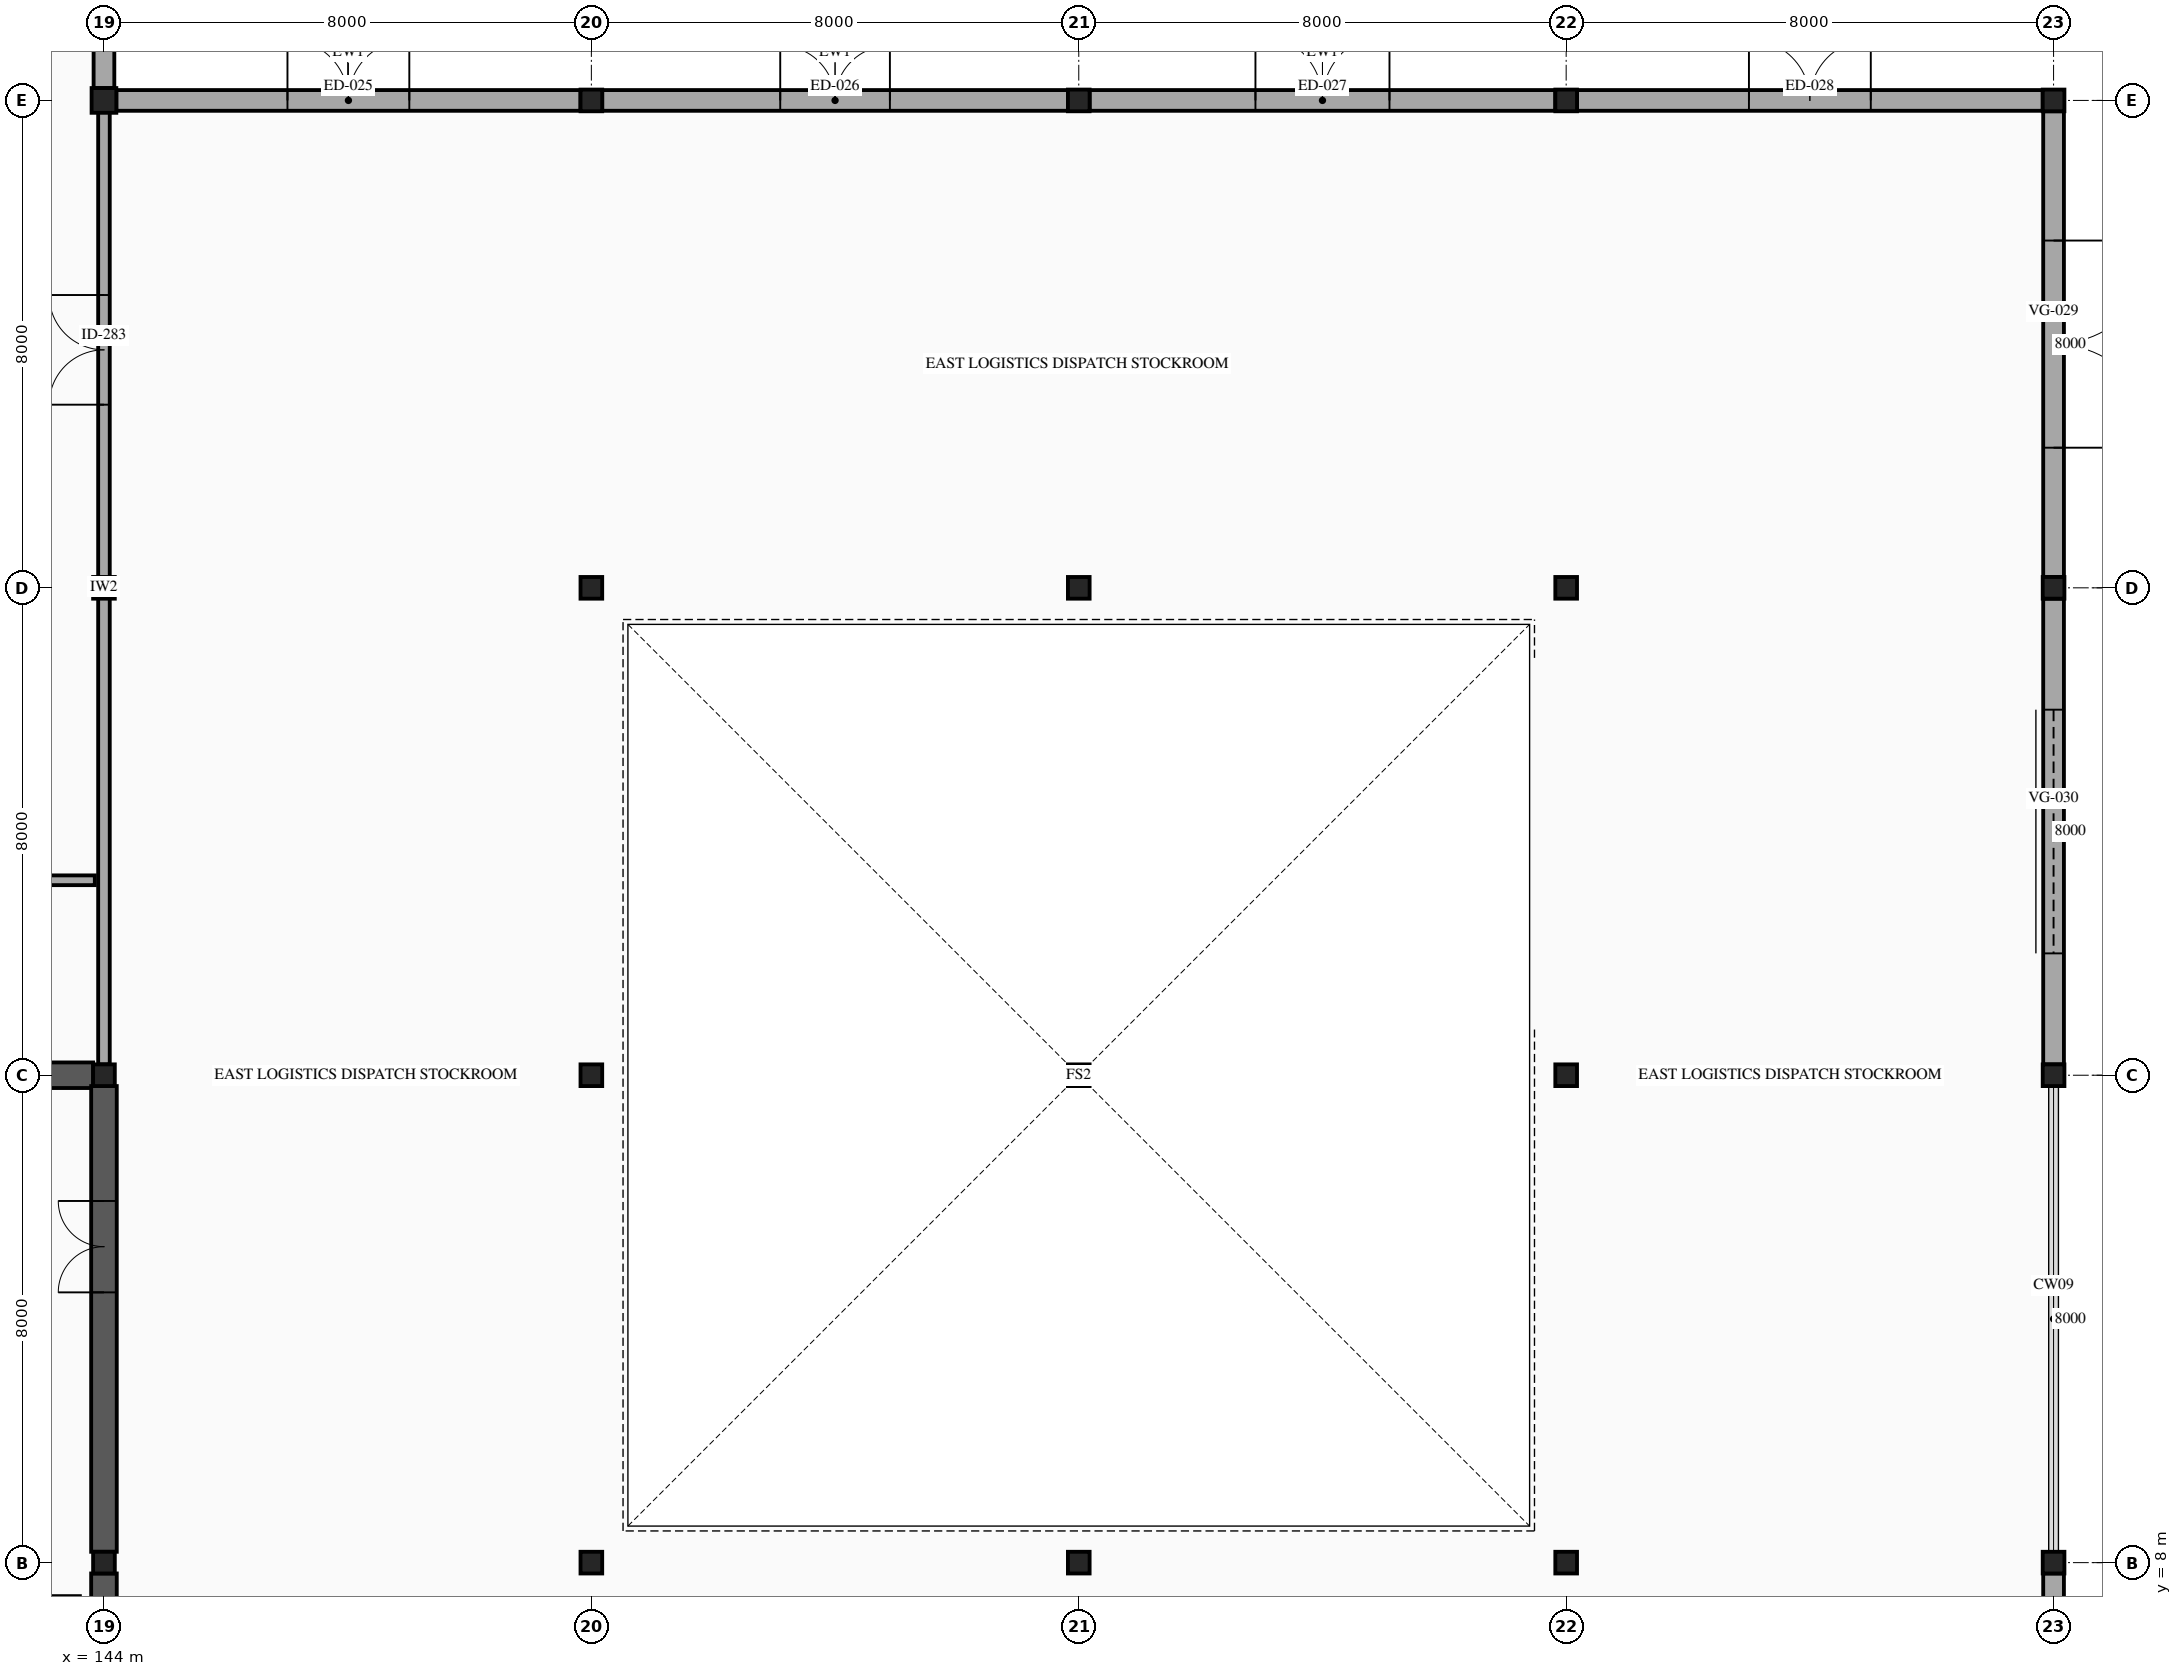
"""IFC4 building model, lengths in metres.
Left out: names, types, materials, properties, quantities, classifications, styles, units other than length and angle.
Written with IfcOpenShell. Run it as: python <this file> out.ifc"""

import sys

from ifc_helpers import new_model, si_unit, direction, frame, frame_2d, origin, origin_2d, place, context, subcontext, project, spatial, rectangle, hollow_rectangle, hollow_circle, extrude, element, fill, save


model = new_model("IFC4")
c1 = context("Model", 3, precision=1e-05, world=origin(), true_north=direction((0.0, 1.0)))
c2 = subcontext(c1, "Body", "Model", "MODEL_VIEW")
j1 = project(units=[si_unit("LENGTHUNIT", "METRE"), si_unit("PLANEANGLEUNIT", "RADIAN")], contexts=[c1])
p1 = place(None, origin())
s1 = spatial("IfcSite", under=j1, at=p1, CompositionType="ELEMENT")
p2 = place(p1, origin())
s2 = spatial("IfcBuilding", under=s1, at=p2, CompositionType="ELEMENT")
p3 = place(p2, origin())
s3 = spatial("IfcBuildingStorey", under=s2, at=p3, CompositionType="ELEMENT", Elevation=0.0)
for number, where, z_axis, x_axis in (
    (1, (144.0, 8.0, 0.0), (0.0, 0.0, 1.0), (1.0, 0.0, 0.0)),
    (2, (144.0, 16.0, 0.0), (0.0, 0.0, 1.0), (1.0, 0.0, 0.0)),
    (3, (144.0, 24.0, 0.0), (0.0, 0.0, 1.0), (1.0, 0.0, 0.0)),
):
    element("IfcColumn", number, at=place(p3, frame(where, z_axis=z_axis, x_axis=x_axis)), inside=s3, PredefinedType="COLUMN", context=c2, shape_type="SweptSolid", body=[
        extrude(hollow_rectangle(XDim=0.356, YDim=0.356, WallThickness=0.012, InnerFilletRadius=0.012, OuterFilletRadius=0.024, at=origin_2d()), origin(), (0.0, 0.0, 1.0), 5.6),
    ])
p4 = place(p3, frame((144.0, 32.0, 0.0), z_axis=(0.0, 0.0, 1.0), x_axis=(1.0, 0.0, 0.0)))
e4 = element("IfcColumn", 4, at=p4, inside=s3, PredefinedType="COLUMN", context=c2, shape_type="SweptSolid", body=[
    extrude(hollow_circle(Radius=0.203, WallThickness=0.012, at=origin_2d()), origin(), (0.0, 0.0, 1.0), 5.6),
])
for number, where, z_axis, x_axis in (
    (5, (152.0, 8.0, 0.0), (0.0, 0.0, 1.0), (1.0, 0.0, 0.0)),
    (6, (152.0, 16.0, 0.0), (0.0, 0.0, 1.0), (1.0, 0.0, 0.0)),
    (7, (152.0, 24.0, 0.0), (0.0, 0.0, 1.0), (1.0, 0.0, 0.0)),
    (8, (152.0, 32.0, 0.0), (0.0, 0.0, 1.0), (1.0, 0.0, 0.0)),
    (9, (160.0, 8.0, 0.0), (0.0, 0.0, 1.0), (1.0, 0.0, 0.0)),
    (10, (160.0, 16.0, 0.0), (0.0, 0.0, 1.0), (1.0, 0.0, 0.0)),
    (11, (160.0, 24.0, 0.0), (0.0, 0.0, 1.0), (1.0, 0.0, 0.0)),
    (12, (160.0, 32.0, 0.0), (0.0, 0.0, 1.0), (1.0, 0.0, 0.0)),
    (13, (168.0, 8.0, 0.0), (0.0, 0.0, 1.0), (1.0, 0.0, 0.0)),
    (14, (168.0, 16.0, 0.0), (0.0, 0.0, 1.0), (1.0, 0.0, 0.0)),
    (15, (168.0, 24.0, 0.0), (0.0, 0.0, 1.0), (1.0, 0.0, 0.0)),
    (16, (168.0, 32.0, 0.0), (0.0, 0.0, 1.0), (1.0, 0.0, 0.0)),
    (17, (176.0, 8.0, 0.0), (0.0, 0.0, 1.0), (1.0, 0.0, 0.0)),
    (18, (176.0, 16.0, 0.0), (0.0, 0.0, 1.0), (1.0, 0.0, 0.0)),
    (19, (176.0, 24.0, 0.0), (0.0, 0.0, 1.0), (1.0, 0.0, 0.0)),
    (20, (176.0, 32.0, 0.0), (0.0, 0.0, 1.0), (1.0, 0.0, 0.0)),
):
    element("IfcColumn", number, at=place(p3, frame(where, z_axis=z_axis, x_axis=x_axis)), inside=s3, PredefinedType="COLUMN", context=c2, shape_type="SweptSolid", body=[
        extrude(hollow_rectangle(XDim=0.356, YDim=0.356, WallThickness=0.012, InnerFilletRadius=0.012, OuterFilletRadius=0.024, at=origin_2d()), origin(), (0.0, 0.0, 1.0), 5.6),
    ])
p5 = place(p3, frame((144.0, 39.822, 0.0), z_axis=(0.0, 0.0, 1.0), x_axis=(0.0, -1.0, 0.0)))
e21 = element("IfcWall", 21, at=p5, inside=s3, PredefinedType="STANDARD", context=c2, shape_type="SweptSolid", body=[
    extrude(rectangle(XDim=7.619, YDim=0.34, at=frame_2d((3.81, 0.0))), origin(), (0.0, 0.0, 1.0), 4.58),
])
p6 = place(p5, frame((2.709, 0.0, 0.0)))
e22 = element("IfcOpeningElement", 22, at=p6, cuts=e21, PredefinedType="OPENING", context=c2, shape_type="SweptSolid", body=[
    extrude(rectangle(XDim=2.2, YDim=2.45, at=frame_2d((1.1, 1.225))), frame((0.0, 0.18, 0.0), z_axis=(0.0, -1.0, 0.0), x_axis=(1.0, 0.0, 0.0)), (0.0, 0.0, 1.0), 0.36),
])
p7 = place(p3, frame((144.203, 32.0, 0.0), z_axis=(0.0, 0.0, 1.0), x_axis=(1.0, 0.0, 0.0)))
e23 = element("IfcWall", 23, at=p7, inside=s3, PredefinedType="STANDARD", context=c2, shape_type="SweptSolid", body=[
    extrude(rectangle(XDim=7.619, YDim=0.34, at=frame_2d((3.81, 0.0))), origin(), (0.0, 0.0, 1.0), 4.58),
])
p8 = place(p7, frame((2.809, 0.0, 0.0)))
e24 = element("IfcOpeningElement", 24, at=p8, cuts=e23, PredefinedType="OPENING", context=c2, shape_type="SweptSolid", body=[
    extrude(rectangle(XDim=2.0, YDim=2.35, at=frame_2d((1.0, 1.175))), frame((0.0, 0.18, 0.0), z_axis=(0.0, -1.0, 0.0), x_axis=(1.0, 0.0, 0.0)), (0.0, 0.0, 1.0), 0.36),
])
p9 = place(p3, frame((152.178, 32.0, 0.0), z_axis=(0.0, 0.0, 1.0), x_axis=(1.0, 0.0, 0.0)))
e25 = element("IfcWall", 25, at=p9, inside=s3, PredefinedType="STANDARD", context=c2, shape_type="SweptSolid", body=[
    extrude(rectangle(XDim=7.644, YDim=0.34, at=frame_2d((3.822, 0.0))), origin(), (0.0, 0.0, 1.0), 4.58),
])
p10 = place(p9, frame((2.922, 0.0, 0.0)))
e26 = element("IfcOpeningElement", 26, at=p10, cuts=e25, PredefinedType="OPENING", context=c2, shape_type="SweptSolid", body=[
    extrude(rectangle(XDim=1.8, YDim=2.3, at=frame_2d((0.9, 1.15))), frame((0.0, 0.18, 0.0), z_axis=(0.0, -1.0, 0.0), x_axis=(1.0, 0.0, 0.0)), (0.0, 0.0, 1.0), 0.36),
])
p11 = place(p3, frame((160.178, 32.0, 0.0), z_axis=(0.0, 0.0, 1.0), x_axis=(1.0, 0.0, 0.0)))
e27 = element("IfcWall", 27, at=p11, inside=s3, PredefinedType="STANDARD", context=c2, shape_type="SweptSolid", body=[
    extrude(rectangle(XDim=7.644, YDim=0.34, at=frame_2d((3.822, 0.0))), origin(), (0.0, 0.0, 1.0), 4.58),
])
p12 = place(p11, frame((2.722, 0.0, 0.0)))
e28 = element("IfcOpeningElement", 28, at=p12, cuts=e27, PredefinedType="OPENING", context=c2, shape_type="SweptSolid", body=[
    extrude(rectangle(XDim=2.2, YDim=2.45, at=frame_2d((1.1, 1.225))), frame((0.0, 0.18, 0.0), z_axis=(0.0, -1.0, 0.0), x_axis=(1.0, 0.0, 0.0)), (0.0, 0.0, 1.0), 0.36),
])
p13 = place(p3, frame((168.178, 32.0, 0.0), z_axis=(0.0, 0.0, 1.0), x_axis=(1.0, 0.0, 0.0)))
e29 = element("IfcWall", 29, at=p13, inside=s3, PredefinedType="STANDARD", context=c2, shape_type="SweptSolid", body=[
    extrude(rectangle(XDim=7.644, YDim=0.34, at=frame_2d((3.822, 0.0))), origin(), (0.0, 0.0, 1.0), 4.58),
])
p14 = place(p13, frame((2.822, 0.0, 0.0)))
e30 = element("IfcOpeningElement", 30, at=p14, cuts=e29, PredefinedType="OPENING", context=c2, shape_type="SweptSolid", body=[
    extrude(rectangle(XDim=2.0, YDim=2.35, at=frame_2d((1.0, 1.175))), frame((0.0, 0.18, 0.0), z_axis=(0.0, -1.0, 0.0), x_axis=(1.0, 0.0, 0.0)), (0.0, 0.0, 1.0), 0.36),
])
p15 = place(p3, frame((176.0, 31.822, 0.0), z_axis=(0.0, 0.0, 1.0), x_axis=(0.0, -1.0, 0.0)))
e31 = element("IfcWall", 31, at=p15, inside=s3, PredefinedType="STANDARD", context=c2, shape_type="SweptSolid", body=[
    extrude(rectangle(XDim=7.644, YDim=0.34, at=frame_2d((3.822, 0.0))), origin(), (0.0, 0.0, 1.0), 4.58),
])
p16 = place(p15, frame((2.122, 0.0, 0.0)))
e32 = element("IfcOpeningElement", 32, at=p16, cuts=e31, PredefinedType="OPENING", context=c2, shape_type="SweptSolid", body=[
    extrude(rectangle(XDim=3.4, YDim=2.5, at=frame_2d((1.7, 1.25))), frame((0.0, 0.18, 0.0), z_axis=(0.0, -1.0, 0.0), x_axis=(1.0, 0.0, 0.0)), (0.0, 0.0, 1.0), 0.36),
])
p17 = place(p3, frame((176.0, 23.822, 0.0), z_axis=(0.0, 0.0, 1.0), x_axis=(0.0, -1.0, 0.0)))
e33 = element("IfcWall", 33, at=p17, inside=s3, PredefinedType="STANDARD", context=c2, shape_type="SweptSolid", body=[
    extrude(rectangle(XDim=7.644, YDim=0.34, at=frame_2d((3.822, 0.0))), origin(), (0.0, 0.0, 1.0), 4.58),
])
p18 = place(p17, frame((1.822, 0.0, 0.0)))
e34 = element("IfcOpeningElement", 34, at=p18, cuts=e33, PredefinedType="OPENING", context=c2, shape_type="SweptSolid", body=[
    extrude(rectangle(XDim=4.0, YDim=2.75, at=frame_2d((2.0, 1.375))), frame((0.0, 0.18, 0.0), z_axis=(0.0, -1.0, 0.0), x_axis=(1.0, 0.0, 0.0)), (0.0, 0.0, 1.0), 0.36),
])
p19 = place(p3, frame((176.0, 7.822, 0.0), z_axis=(0.0, 0.0, 1.0), x_axis=(0.0, -1.0, 0.0)))
e35 = element("IfcWall", 35, at=p19, inside=s3, PredefinedType="STANDARD", context=c2, shape_type="SweptSolid", body=[
    extrude(rectangle(XDim=7.644, YDim=0.34, at=frame_2d((3.822, 0.0))), origin(), (0.0, 0.0, 1.0), 4.58),
])
p20 = place(p19, frame((2.822, 0.0, 0.0)))
e36 = element("IfcOpeningElement", 36, at=p20, cuts=e35, PredefinedType="OPENING", context=c2, shape_type="SweptSolid", body=[
    extrude(rectangle(XDim=2.0, YDim=2.35, at=frame_2d((1.0, 1.175))), frame((0.0, 0.18, 0.0), z_axis=(0.0, -1.0, 0.0), x_axis=(1.0, 0.0, 0.0)), (0.0, 0.0, 1.0), 0.36),
])
p21 = place(p3, frame((136.375, 16.0, 0.0), z_axis=(0.0, 0.0, 1.0), x_axis=(1.0, 0.0, 0.0)))
e37 = element("IfcWall", 37, at=p21, inside=s3, PredefinedType="SHEAR", context=c2, shape_type="SweptSolid", body=[
    extrude(rectangle(XDim=7.447, YDim=0.42, at=frame_2d((3.724, 0.0))), origin(), (0.0, 0.0, 1.0), 5.38),
])
p22 = place(p21, frame((2.974, 0.0, 0.0)))
e38 = element("IfcOpeningElement", 38, at=p22, cuts=e37, PredefinedType="OPENING", context=c2, shape_type="SweptSolid", body=[
    extrude(rectangle(XDim=1.5, YDim=2.15, at=frame_2d((0.75, 1.075))), frame((0.0, 0.22, 0.0), z_axis=(0.0, -1.0, 0.0), x_axis=(1.0, 0.0, 0.0)), (0.0, 0.0, 1.0), 0.44),
])
p23 = place(p3, frame((144.0, 0.178, 0.0), z_axis=(0.0, 0.0, 1.0), x_axis=(0.0, 1.0, 0.0)))
e39 = element("IfcWall", 39, at=p23, inside=s3, PredefinedType="SHEAR", context=c2, shape_type="SweptSolid", body=[
    extrude(rectangle(XDim=7.644, YDim=0.42, at=frame_2d((3.822, 0.0))), origin(), (0.0, 0.0, 1.0), 5.38),
])
p24 = place(p23, frame((1.736, 0.0, 0.0)))
e40 = element("IfcOpeningElement", 40, at=p24, cuts=e39, PredefinedType="OPENING", context=c2, shape_type="SweptSolid", body=[
    extrude(rectangle(XDim=1.5, YDim=2.15, at=frame_2d((0.75, 1.075))), frame((0.0, 0.22, 0.0), z_axis=(0.0, -1.0, 0.0), x_axis=(1.0, 0.0, 0.0)), (0.0, 0.0, 1.0), 0.44),
])
p25 = place(p3, frame((144.0, 8.178, 0.0), z_axis=(0.0, 0.0, 1.0), x_axis=(0.0, 1.0, 0.0)))
e41 = element("IfcWall", 41, at=p25, inside=s3, PredefinedType="SHEAR", context=c2, shape_type="SweptSolid", body=[
    extrude(rectangle(XDim=7.644, YDim=0.42, at=frame_2d((3.822, 0.0))), origin(), (0.0, 0.0, 1.0), 5.38),
])
p26 = place(p25, frame((4.258, 0.0, 0.0)))
e42 = element("IfcOpeningElement", 42, at=p26, cuts=e41, PredefinedType="OPENING", context=c2, shape_type="SweptSolid", body=[
    extrude(rectangle(XDim=1.5, YDim=2.15, at=frame_2d((0.75, 1.075))), frame((0.0, 0.22, 0.0), z_axis=(0.0, -1.0, 0.0), x_axis=(1.0, 0.0, 0.0)), (0.0, 0.0, 1.0), 0.44),
])
p27 = place(p3, frame((141.295, 7.33, 0.0), z_axis=(0.0, 0.0, 1.0), x_axis=(1.0, 0.0, 0.0)))
e43 = element("IfcWall", 43, at=p27, inside=s3, PredefinedType="PARTITIONING", context=c2, shape_type="SweptSolid", body=[
    extrude(rectangle(XDim=2.31, YDim=0.24, at=frame_2d((1.155, 0.0))), origin(), (0.0, 0.0, 1.0), 5.38),
])
p28 = place(p27, frame((0.605, 0.0, 0.0)))
e44 = element("IfcOpeningElement", 44, at=p28, cuts=e43, PredefinedType="OPENING", context=c2, shape_type="SweptSolid", body=[
    extrude(rectangle(XDim=1.1, YDim=2.15, at=frame_2d((0.55, 1.075))), frame((0.0, 0.13, 0.0), z_axis=(0.0, -1.0, 0.0), x_axis=(1.0, 0.0, 0.0)), (0.0, 0.0, 1.0), 0.26),
])
p29 = place(p3, frame((124.4, 19.2, 0.0), z_axis=(0.0, 0.0, 1.0), x_axis=(1.0, 0.0, 0.0)))
e45 = element("IfcWall", 45, at=p29, inside=s3, PredefinedType="PARTITIONING", context=c2, shape_type="SweptSolid", body=[
    extrude(rectangle(XDim=19.45, YDim=0.16, at=frame_2d((9.725, 0.0))), origin(), (0.0, 0.0, 1.0), 4.58),
])
p30 = place(p29, frame((14.92, 0.0, 0.0)))
e46 = element("IfcOpeningElement", 46, at=p30, cuts=e45, PredefinedType="OPENING", context=c2, shape_type="SweptSolid", body=[
    extrude(rectangle(XDim=1.7, YDim=2.25, at=frame_2d((0.85, 1.125))), frame((0.0, 0.09, 0.0), z_axis=(0.0, -1.0, 0.0), x_axis=(1.0, 0.0, 0.0)), (0.0, 0.0, 1.0), 0.18),
])
p31 = place(p3, frame((144.0, 16.178, 0.0), z_axis=(0.0, 0.0, 1.0), x_axis=(0.0, 1.0, 0.0)))
e47 = element("IfcWall", 47, at=p31, inside=s3, PredefinedType="PARTITIONING", context=c2, shape_type="SweptSolid", body=[
    extrude(rectangle(XDim=15.672, YDim=0.19, at=frame_2d((7.836, 0.0))), origin(), (0.0, 0.0, 1.0), 4.58),
])
p32 = place(p31, frame((10.828, 0.0, 0.0)))
e48 = element("IfcOpeningElement", 48, at=p32, cuts=e47, PredefinedType="OPENING", context=c2, shape_type="SweptSolid", body=[
    extrude(rectangle(XDim=1.8, YDim=2.25, at=frame_2d((0.9, 1.125))), frame((0.0, 0.105, 0.0), z_axis=(0.0, -1.0, 0.0), x_axis=(1.0, 0.0, 0.0)), (0.0, 0.0, 1.0), 0.21),
])
p33 = place(p8, origin())
e49 = element("IfcDoor", 49, at=p33, inside=s3, OperationType="DOUBLE_DOOR_SINGLE_SWING", PredefinedType="DOOR", context=c2, shape_type="SweptSolid", body=[
    extrude(rectangle(XDim=2.0, YDim=2.35, at=frame_2d((1.0, 1.175))), frame((0.0, 0.025, 0.0), z_axis=(0.0, -1.0, 0.0), x_axis=(1.0, 0.0, 0.0)), (0.0, 0.0, 1.0), 0.05),
])
fill(e24, e49)
p34 = place(p10, origin())
e50 = element("IfcDoor", 50, at=p34, inside=s3, OperationType="DOUBLE_DOOR_SINGLE_SWING", PredefinedType="DOOR", context=c2, shape_type="SweptSolid", body=[
    extrude(rectangle(XDim=1.8, YDim=2.3, at=frame_2d((0.9, 1.15))), frame((0.0, 0.025, 0.0), z_axis=(0.0, -1.0, 0.0), x_axis=(1.0, 0.0, 0.0)), (0.0, 0.0, 1.0), 0.05),
])
fill(e26, e50)
p35 = place(p12, origin())
e51 = element("IfcDoor", 51, at=p35, inside=s3, OperationType="DOUBLE_DOOR_SINGLE_SWING", PredefinedType="DOOR", context=c2, shape_type="SweptSolid", body=[
    extrude(rectangle(XDim=2.2, YDim=2.45, at=frame_2d((1.1, 1.225))), frame((0.0, 0.025, 0.0), z_axis=(0.0, -1.0, 0.0), x_axis=(1.0, 0.0, 0.0)), (0.0, 0.0, 1.0), 0.05),
])
fill(e28, e51)
p36 = place(p14, origin())
e52 = element("IfcDoor", 52, at=p36, inside=s3, OperationType="DOUBLE_DOOR_SINGLE_SWING", PredefinedType="DOOR", context=c2, shape_type="SweptSolid", body=[
    extrude(rectangle(XDim=2.0, YDim=2.35, at=frame_2d((1.0, 1.175))), frame((0.0, 0.025, 0.0), z_axis=(0.0, -1.0, 0.0), x_axis=(1.0, 0.0, 0.0)), (0.0, 0.0, 1.0), 0.05),
])
fill(e30, e52)
p37 = place(p16, origin())
e53 = element("IfcDoor", 53, at=p37, inside=s3, OperationType="DOUBLE_DOOR_SINGLE_SWING", PredefinedType="GATE", context=c2, shape_type="SweptSolid", body=[
    extrude(rectangle(XDim=3.4, YDim=2.5, at=frame_2d((1.7, 1.25))), frame((0.0, 0.025, 0.0), z_axis=(0.0, -1.0, 0.0), x_axis=(1.0, 0.0, 0.0)), (0.0, 0.0, 1.0), 0.05),
])
fill(e32, e53)
p38 = place(p18, origin())
e54 = element("IfcDoor", 54, at=p38, inside=s3, OperationType="ROLLINGUP", PredefinedType="GATE", context=c2, shape_type="SweptSolid", body=[
    extrude(rectangle(XDim=4.0, YDim=2.75, at=frame_2d((2.0, 1.375))), frame((0.0, 0.025, 0.0), z_axis=(0.0, -1.0, 0.0), x_axis=(1.0, 0.0, 0.0)), (0.0, 0.0, 1.0), 0.05),
])
fill(e34, e54)
p39 = place(p26, origin())
e55 = element("IfcDoor", 55, at=p39, inside=s3, OperationType="DOUBLE_DOOR_SINGLE_SWING", PredefinedType="DOOR", context=c2, shape_type="SweptSolid", body=[
    extrude(rectangle(XDim=1.5, YDim=2.15, at=frame_2d((0.75, 1.075))), frame((0.0, 0.025, 0.0), z_axis=(0.0, -1.0, 0.0), x_axis=(1.0, 0.0, 0.0)), (0.0, 0.0, 1.0), 0.05),
])
fill(e42, e55)
p40 = place(p32, origin())
e56 = element("IfcDoor", 56, at=p40, inside=s3, OperationType="DOUBLE_DOOR_SINGLE_SWING", PredefinedType="DOOR", context=c2, shape_type="SweptSolid", body=[
    extrude(rectangle(XDim=1.8, YDim=2.25, at=frame_2d((0.9, 1.125))), frame((0.0, 0.025, 0.0), z_axis=(0.0, -1.0, 0.0), x_axis=(1.0, 0.0, 0.0)), (0.0, 0.0, 1.0), 0.05),
])
fill(e48, e56)
save(model, sys.argv[1])
